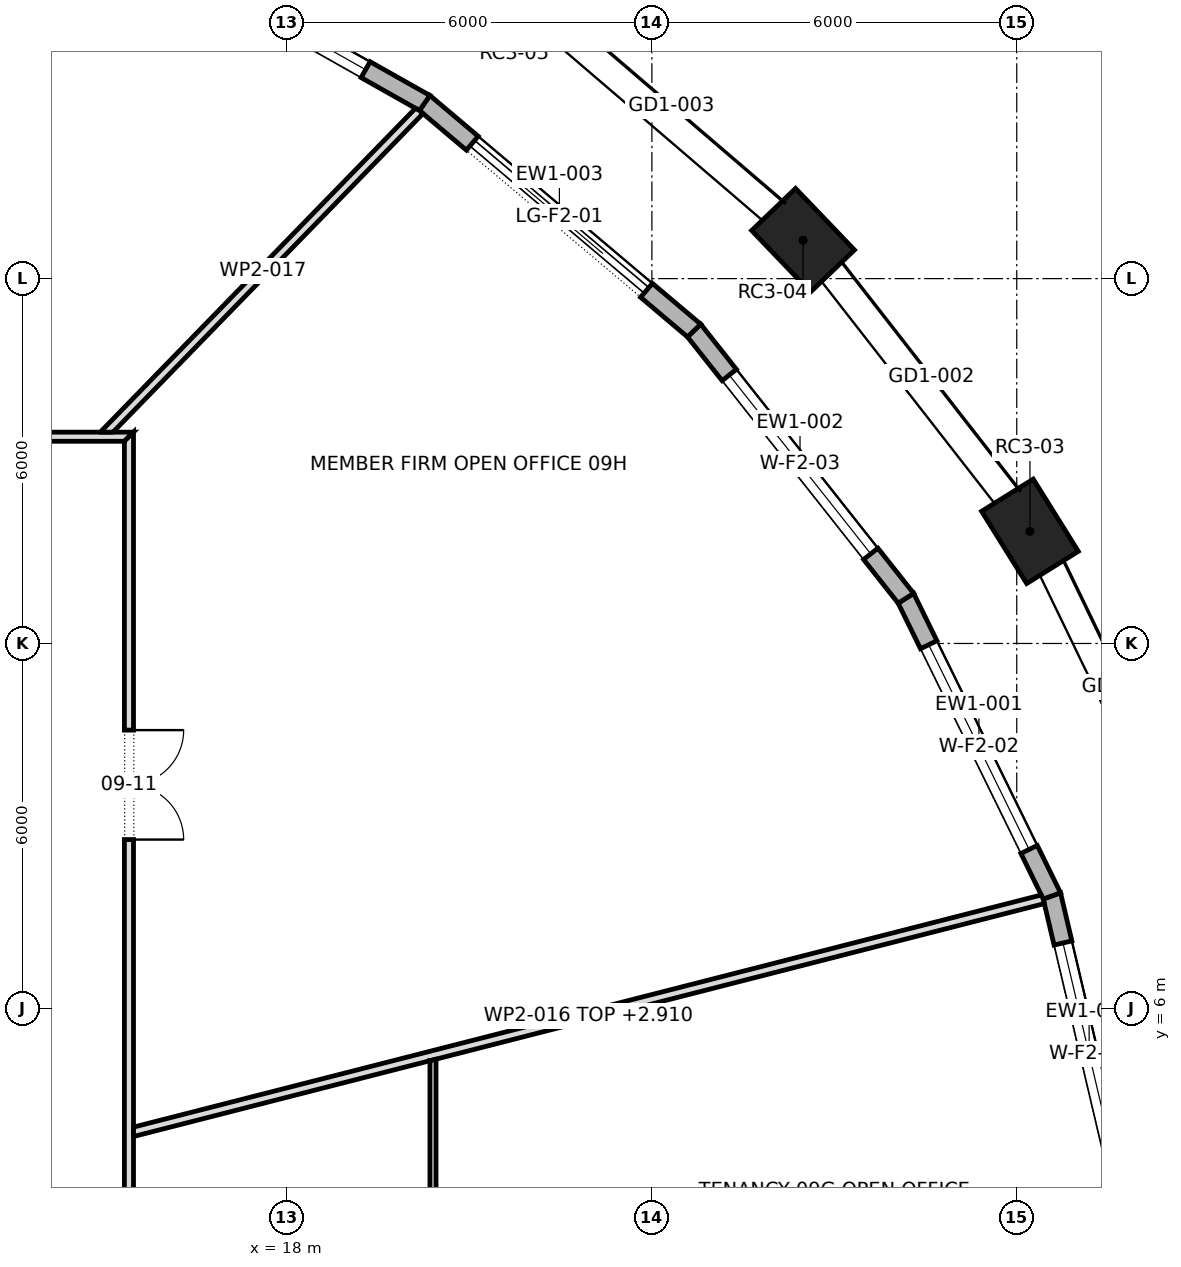
"""IFC4 building model, lengths in metres.
Left out: names, types, materials, properties, quantities, classifications, styles, units other than length and angle.
Written with IfcOpenShell. Run it as: python <this file> out.ifc"""

import sys

from ifc_helpers import new_model, si_unit, direction, frame, frame_2d, origin, origin_2d, place, context, subcontext, project, spatial, polyline, rectangle, outline, extrude, element, fill, save


model = new_model("IFC4")
c1 = context("Model", 3, precision=1e-05, world=origin(), true_north=direction((0.0, 1.0)))
c2 = subcontext(c1, "Body", "Model", "MODEL_VIEW")
j1 = project(units=[si_unit("LENGTHUNIT", "METRE"), si_unit("PLANEANGLEUNIT", "RADIAN")], contexts=[c1])
p1 = place(None, origin())
s1 = spatial("IfcSite", under=j1, at=p1, CompositionType="ELEMENT")
p2 = place(p1, origin())
s2 = spatial("IfcBuilding", under=s1, at=p2, CompositionType="ELEMENT")
p3 = place(p2, frame((0.0, 0.0, 138.1)))
s3 = spatial("IfcBuildingStorey", under=s2, at=p3, CompositionType="ELEMENT", Elevation=138.1)
for number, where, z_axis, x_axis in (
    (1, (30.217, 13.844, 0.0), (0.0, 0.0, 1.0), (-0.529, 0.849, 0.0)),
    (2, (26.486, 18.631, 0.0), (0.0, 0.0, 1.0), (-0.692, 0.722, 0.0)),
):
    element("IfcColumn", number, at=place(p3, frame(where, z_axis=z_axis, x_axis=x_axis)), inside=s3, PredefinedType="COLUMN", context=c2, shape_type="SweptSolid", body=[
        extrude(rectangle(XDim=1.4, YDim=1.0, at=origin_2d()), origin(), (0.0, 0.0, 1.0), 4.2),
    ])
p4 = place(p3, frame((31.802, 2.65, 0.0), z_axis=(0.0, 0.0, 1.0), x_axis=(-0.229227895667, 0.973372781543, 0.0)))
e3 = element("IfcWall", 3, at=p4, inside=s3, PredefinedType="STANDARD", context=c2, shape_type="SweptSolid", body=[
    extrude(outline(polyline([(-0.017, -0.15), (5.357, -0.15), (5.323, 0.15), (0.017, 0.15), (-0.017, -0.15)])), origin(), (0.0, 0.0, 1.0), 3.9),
])
p5 = place(p4, frame((0.795, 0.0, 0.6)))
e4 = element("IfcOpeningElement", 4, at=p5, cuts=e3, PredefinedType="OPENING", context=c2, shape_type="SweptSolid", body=[
    extrude(rectangle(XDim=3.75, YDim=2.85, at=frame_2d((1.875, 1.425))), frame((0.0, 0.162, 0.0), z_axis=(0.0, -1.0, 0.0), x_axis=(1.0, 0.0, 0.0)), (0.0, 0.0, 1.0), 0.324),
])
p6 = place(p3, frame((30.578, 7.848, 0.0), z_axis=(0.0, 0.0, 1.0), x_axis=(-0.440321465864, 0.897840189956, 0.0)))
e5 = element("IfcWall", 5, at=p6, inside=s3, PredefinedType="STANDARD", context=c2, shape_type="SweptSolid", body=[
    extrude(outline(polyline([(-0.017, -0.15), (5.468, -0.15), (5.435, 0.15), (0.017, 0.15), (-0.017, -0.15)])), origin(), (0.0, 0.0, 1.0), 3.9),
])
p7 = place(p6, frame((0.851, 0.0, 0.6)))
e6 = element("IfcOpeningElement", 6, at=p7, cuts=e5, PredefinedType="OPENING", context=c2, shape_type="SweptSolid", body=[
    extrude(rectangle(XDim=3.75, YDim=2.85, at=frame_2d((1.875, 1.425))), frame((0.0, 0.162, 0.0), z_axis=(0.0, -1.0, 0.0), x_axis=(1.0, 0.0, 0.0)), (0.0, 0.0, 1.0), 0.324),
])
p8 = place(p3, frame((28.177, 12.743, 0.0), z_axis=(0.0, 0.0, 1.0), x_axis=(-0.620464552431, 0.784234492468, 0.0)))
e7 = element("IfcWall", 7, at=p8, inside=s3, PredefinedType="STANDARD", context=c2, shape_type="SweptSolid", body=[
    extrude(outline(polyline([(-0.016, -0.15), (5.629, -0.15), (5.599, 0.15), (0.016, 0.15), (-0.016, -0.15)])), origin(), (0.0, 0.0, 1.0), 3.9),
])
p9 = place(p8, frame((0.932, 0.0, 0.6)))
e8 = element("IfcOpeningElement", 8, at=p9, cuts=e7, PredefinedType="OPENING", context=c2, shape_type="SweptSolid", body=[
    extrude(rectangle(XDim=3.75, YDim=2.85, at=frame_2d((1.875, 1.425))), frame((0.0, 0.162, 0.0), z_axis=(0.0, -1.0, 0.0), x_axis=(1.0, 0.0, 0.0)), (0.0, 0.0, 1.0), 0.324),
])
p10 = place(p3, frame((24.694, 17.146, 0.0), z_axis=(0.0, 0.0, 1.0), x_axis=(-0.763963973896, 0.645258898884, 0.0)))
e9 = element("IfcWall", 9, at=p10, inside=s3, PredefinedType="STANDARD", context=c2, shape_type="SweptSolid", body=[
    extrude(outline(polyline([(-0.015, -0.15), (5.814, -0.15), (5.786, 0.15), (0.015, 0.15), (-0.015, -0.15)])), origin(), (0.0, 0.0, 1.0), 3.9),
])
p11 = place(p10, frame((1.025, 0.0, 0.0)))
e10 = element("IfcOpeningElement", 10, at=p11, cuts=e9, PredefinedType="OPENING", context=c2, shape_type="SweptSolid", body=[
    extrude(rectangle(XDim=3.75, YDim=3.45, at=frame_2d((1.875, 1.725))), frame((0.0, 0.162, 0.0), z_axis=(0.0, -1.0, 0.0), x_axis=(1.0, 0.0, 0.0)), (0.0, 0.0, 1.0), 0.324),
])
p12 = place(p3, frame((20.263, 20.888, 0.0), z_axis=(0.0, 0.0, 1.0), x_axis=(-0.87090857883, 0.491445060327, 0.0)))
e11 = element("IfcWall", 11, at=p12, inside=s3, PredefinedType="STANDARD", context=c2, shape_type="SweptSolid", body=[
    extrude(outline(polyline([(-0.014, -0.15), (5.994, -0.15), (5.967, 0.15), (0.014, 0.15), (-0.014, -0.15)])), origin(), (0.0, 0.0, 1.0), 3.9),
])
p13 = place(p12, frame((1.115, 0.0, 0.6)))
e12 = element("IfcOpeningElement", 12, at=p13, cuts=e11, PredefinedType="OPENING", context=c2, shape_type="SweptSolid", body=[
    extrude(rectangle(XDim=3.75, YDim=2.85, at=frame_2d((1.875, 1.425))), frame((0.0, 0.162, 0.0), z_axis=(0.0, -1.0, 0.0), x_axis=(1.0, 0.0, 0.0)), (0.0, 0.0, 1.0), 0.324),
])
p14 = place(p3, frame((-15.475, 15.4, 0.0), z_axis=(0.0, 0.0, 1.0), x_axis=(1.0, 0.0, 0.0)))
e13 = element("IfcWall", 13, at=p14, inside=s3, PredefinedType="PARTITIONING", context=c2, shape_type="SweptSolid", body=[
    extrude(outline(polyline([(0.15, -0.075), (2.066, -0.075), (3.981, -0.075), (5.897, -0.075), (7.812, -0.075), (9.728, -0.075), (11.644, -0.075), (13.56, -0.075), (15.475, -0.075), (17.391, -0.075), (19.306, -0.075), (21.222, -0.075), (23.138, -0.075), (25.053, -0.075), (26.969, -0.075), (28.885, -0.075), (30.8, -0.075), (30.95, 0.075), (29.016, 0.075), (27.081, 0.075), (25.147, 0.075), (23.212, 0.075), (21.278, 0.075), (19.344, 0.075), (17.409, 0.075), (15.475, 0.075), (13.541, 0.075), (11.606, 0.075), (9.672, 0.075), (7.738, 0.075), (5.803, 0.075), (3.869, 0.075), (1.935, 0.075), (0.0, 0.075), (0.15, -0.075)])), origin(), (0.0, 0.0, 1.0), 3.9),
])
p15 = place(p14, frame((22.955, 0.0, 0.0)))
e14 = element("IfcOpeningElement", 14, at=p15, cuts=e13, PredefinedType="OPENING", context=c2, shape_type="SweptSolid", body=[
    extrude(rectangle(XDim=1.8, YDim=2.1, at=frame_2d((0.9, 1.05))), frame((0.0, 0.087, 0.0), z_axis=(0.0, -1.0, 0.0), x_axis=(1.0, 0.0, 0.0)), (0.0, 0.0, 1.0), 0.174),
])
p16 = place(p14, frame((7.995, 0.0, 0.0)))
e15 = element("IfcOpeningElement", 15, at=p16, cuts=e13, PredefinedType="OPENING", context=c2, shape_type="SweptSolid", body=[
    extrude(rectangle(XDim=1.8, YDim=2.1, at=frame_2d((0.9, 1.05))), frame((0.0, 0.087, 0.0), z_axis=(0.0, -1.0, 0.0), x_axis=(1.0, 0.0, 0.0)), (0.0, 0.0, 1.0), 0.174),
])
p17 = place(p3, frame((15.4, -15.475, 0.0), z_axis=(0.0, 0.0, 1.0), x_axis=(0.0, 1.0, 0.0)))
e16 = element("IfcWall", 16, at=p17, inside=s3, PredefinedType="PARTITIONING", context=c2, shape_type="SweptSolid", body=[
    extrude(outline(polyline([(0.0, -0.075), (1.935, -0.075), (3.869, -0.075), (5.803, -0.075), (7.738, -0.075), (9.672, -0.075), (11.606, -0.075), (13.541, -0.075), (15.475, -0.075), (17.409, -0.075), (19.344, -0.075), (21.278, -0.075), (23.212, -0.075), (25.147, -0.075), (27.081, -0.075), (29.016, -0.075), (30.95, -0.075), (30.8, 0.075), (28.885, 0.075), (26.969, 0.075), (25.053, 0.075), (23.138, 0.075), (21.222, 0.075), (19.306, 0.075), (17.391, 0.075), (15.475, 0.075), (13.56, 0.075), (11.644, 0.075), (9.728, 0.075), (7.812, 0.075), (5.897, 0.075), (3.981, 0.075), (2.066, 0.075), (0.15, 0.075), (0.0, -0.075)])), origin(), (0.0, 0.0, 1.0), 3.9),
])
p18 = place(p17, frame((9.76, 0.0, 0.0)))
e17 = element("IfcOpeningElement", 17, at=p18, cuts=e16, PredefinedType="OPENING", context=c2, shape_type="SweptSolid", body=[
    extrude(rectangle(XDim=1.0, YDim=2.1, at=frame_2d((0.5, 1.05))), frame((0.0, 0.087, 0.0), z_axis=(0.0, -1.0, 0.0), x_axis=(1.0, 0.0, 0.0)), (0.0, 0.0, 1.0), 0.174),
])
p19 = place(p17, frame((15.21, 0.0, 0.0)))
e18 = element("IfcOpeningElement", 18, at=p19, cuts=e16, PredefinedType="OPENING", context=c2, shape_type="SweptSolid", body=[
    extrude(rectangle(XDim=1.0, YDim=2.1, at=frame_2d((0.5, 1.05))), frame((0.0, 0.087, 0.0), z_axis=(0.0, -1.0, 0.0), x_axis=(1.0, 0.0, 0.0)), (0.0, 0.0, 1.0), 0.174),
])
p20 = place(p17, frame((24.25, 0.0, 0.0)))
e19 = element("IfcOpeningElement", 19, at=p20, cuts=e16, PredefinedType="OPENING", context=c2, shape_type="SweptSolid", body=[
    extrude(rectangle(XDim=1.8, YDim=2.1, at=frame_2d((0.9, 1.05))), frame((0.0, 0.087, 0.0), z_axis=(0.0, -1.0, 0.0), x_axis=(1.0, 0.0, 0.0)), (0.0, 0.0, 1.0), 0.174),
])
p21 = place(p3, frame((15.457, 3.965, 0.0), z_axis=(0.0, 0.0, 1.0), x_axis=(0.968826155352, 0.247741560312, 0.0)))
e20 = element("IfcWall", 20, at=p21, inside=s3, PredefinedType="PARTITIONING", context=c2, shape_type="SweptSolid", body=[
    extrude(outline(polyline([(0.0, -0.075), (1.677, -0.075), (3.354, -0.075), (5.031, -0.075), (5.032, -0.073), (5.038, -0.075), (6.775, -0.075), (8.512, -0.075), (10.249, -0.075), (11.986, -0.075), (13.723, -0.075), (15.46, -0.075), (15.46, 0.01), (15.447, 0.075), (13.521, 0.075), (11.594, 0.075), (9.668, 0.075), (7.742, 0.075), (5.816, 0.075), (3.89, 0.075), (1.964, 0.075), (0.038, 0.075), (0.0, -0.073), (0.0, -0.075)])), origin(), (0.0, 0.0, 1.0), 2.91),
])
p22 = place(p3, frame((20.182, 20.767, 0.0), z_axis=(0.0, 0.0, 1.0), x_axis=(-0.697398145205, -0.716683910148, 0.0)))
e21 = element("IfcWall", 21, at=p22, inside=s3, PredefinedType="PARTITIONING", context=c2, shape_type="SweptSolid", body=[
    extrude(outline(polyline([(7.456, -0.075), (7.456, -0.075), (7.363, 0.021), (7.363, 0.021), (7.311, 0.075), (5.483, 0.075), (3.655, 0.075), (1.828, 0.075), (0.0, 0.075), (0.0, 0.073), (0.005, -0.002), (0.024, -0.075), (1.882, -0.075), (3.74, -0.075), (5.598, -0.075), (7.456, -0.075)])), origin(), (0.0, 0.0, 1.0), 3.9),
])
p23 = place(p3, frame((20.4, -9.148, 0.0), z_axis=(0.0, 0.0, 1.0), x_axis=(0.0, 1.0, 0.0)))
e22 = element("IfcWall", 22, at=p23, inside=s3, PredefinedType="PARTITIONING", context=c2, shape_type="SweptSolid", body=[
    extrude(outline(polyline([(0.0, -0.05), (1.927, -0.05), (3.854, -0.05), (3.854, -0.048), (3.861, -0.05), (5.603, -0.05), (7.345, -0.05), (9.087, -0.05), (10.828, -0.05), (12.57, -0.05), (14.312, -0.05), (14.312, -0.049), (14.287, 0.05), (12.573, 0.05), (10.859, 0.05), (9.146, 0.05), (7.432, 0.05), (5.719, 0.05), (5.719, 0.05), (5.618, 0.05), (5.618, 0.05), (3.761, 0.05), (1.903, 0.05), (0.045, 0.05), (0.0, -0.05), (0.0, -0.05)])), origin(), (0.0, 0.0, 1.0), 3.9),
])
p24 = place(p23, frame((10.463, 0.0, 0.0)))
e23 = element("IfcOpeningElement", 23, at=p24, cuts=e22, PredefinedType="OPENING", context=c2, shape_type="SweptSolid", body=[
    extrude(rectangle(XDim=0.9, YDim=2.1, at=frame_2d((0.45, 1.05))), frame((0.0, 0.062, 0.0), z_axis=(0.0, -1.0, 0.0), x_axis=(1.0, 0.0, 0.0)), (0.0, 0.0, 1.0), 0.124),
])
p25 = place(p5, origin())
e24 = element("IfcWindow", 24, at=p25, inside=s3, PartitioningType="TRIPLE_PANEL_VERTICAL", PredefinedType="WINDOW", context=c2, shape_type="SweptSolid", body=[
    extrude(rectangle(XDim=3.75, YDim=2.85, at=frame_2d((1.875, 1.425))), frame((0.0, 0.03, 0.0), z_axis=(0.0, -1.0, 0.0), x_axis=(1.0, 0.0, 0.0)), (0.0, 0.0, 1.0), 0.06),
])
fill(e4, e24)
p26 = place(p7, origin())
e25 = element("IfcWindow", 25, at=p26, inside=s3, PartitioningType="TRIPLE_PANEL_VERTICAL", PredefinedType="WINDOW", context=c2, shape_type="SweptSolid", body=[
    extrude(rectangle(XDim=3.75, YDim=2.85, at=frame_2d((1.875, 1.425))), frame((0.0, 0.03, 0.0), z_axis=(0.0, -1.0, 0.0), x_axis=(1.0, 0.0, 0.0)), (0.0, 0.0, 1.0), 0.06),
])
fill(e6, e25)
p27 = place(p9, origin())
e26 = element("IfcWindow", 26, at=p27, inside=s3, PartitioningType="TRIPLE_PANEL_VERTICAL", PredefinedType="WINDOW", context=c2, shape_type="SweptSolid", body=[
    extrude(rectangle(XDim=3.75, YDim=2.85, at=frame_2d((1.875, 1.425))), frame((0.0, 0.03, 0.0), z_axis=(0.0, -1.0, 0.0), x_axis=(1.0, 0.0, 0.0)), (0.0, 0.0, 1.0), 0.06),
])
fill(e8, e26)
p28 = place(p11, origin())
e27 = element("IfcDoor", 27, at=p28, inside=s3, OperationType="DOUBLE_DOOR_SLIDING", PredefinedType="DOOR", context=c2, shape_type="SweptSolid", body=[
    extrude(rectangle(XDim=3.75, YDim=3.45, at=frame_2d((1.875, 1.725))), frame((0.0, 0.025, 0.0), z_axis=(0.0, -1.0, 0.0), x_axis=(1.0, 0.0, 0.0)), (0.0, 0.0, 1.0), 0.05),
])
fill(e10, e27)
p29 = place(p13, origin())
e28 = element("IfcWindow", 28, at=p29, inside=s3, PartitioningType="TRIPLE_PANEL_VERTICAL", PredefinedType="WINDOW", context=c2, shape_type="SweptSolid", body=[
    extrude(rectangle(XDim=3.75, YDim=2.85, at=frame_2d((1.875, 1.425))), frame((0.0, 0.03, 0.0), z_axis=(0.0, -1.0, 0.0), x_axis=(1.0, 0.0, 0.0)), (0.0, 0.0, 1.0), 0.06),
])
fill(e12, e28)
p30 = place(p20, frame((1.8, 0.0, 0.0), z_axis=(0.0, 0.0, 1.0), x_axis=(-1.0, 0.0, 0.0)))
e29 = element("IfcDoor", 29, at=p30, inside=s3, OperationType="DOUBLE_DOOR_SINGLE_SWING", PredefinedType="DOOR", context=c2, shape_type="SweptSolid", body=[
    extrude(rectangle(XDim=1.8, YDim=2.1, at=frame_2d((0.9, 1.05))), frame((0.0, 0.025, 0.0), z_axis=(0.0, -1.0, 0.0), x_axis=(1.0, 0.0, 0.0)), (0.0, 0.0, 1.0), 0.05),
])
fill(e19, e29)
save(model, sys.argv[1])
